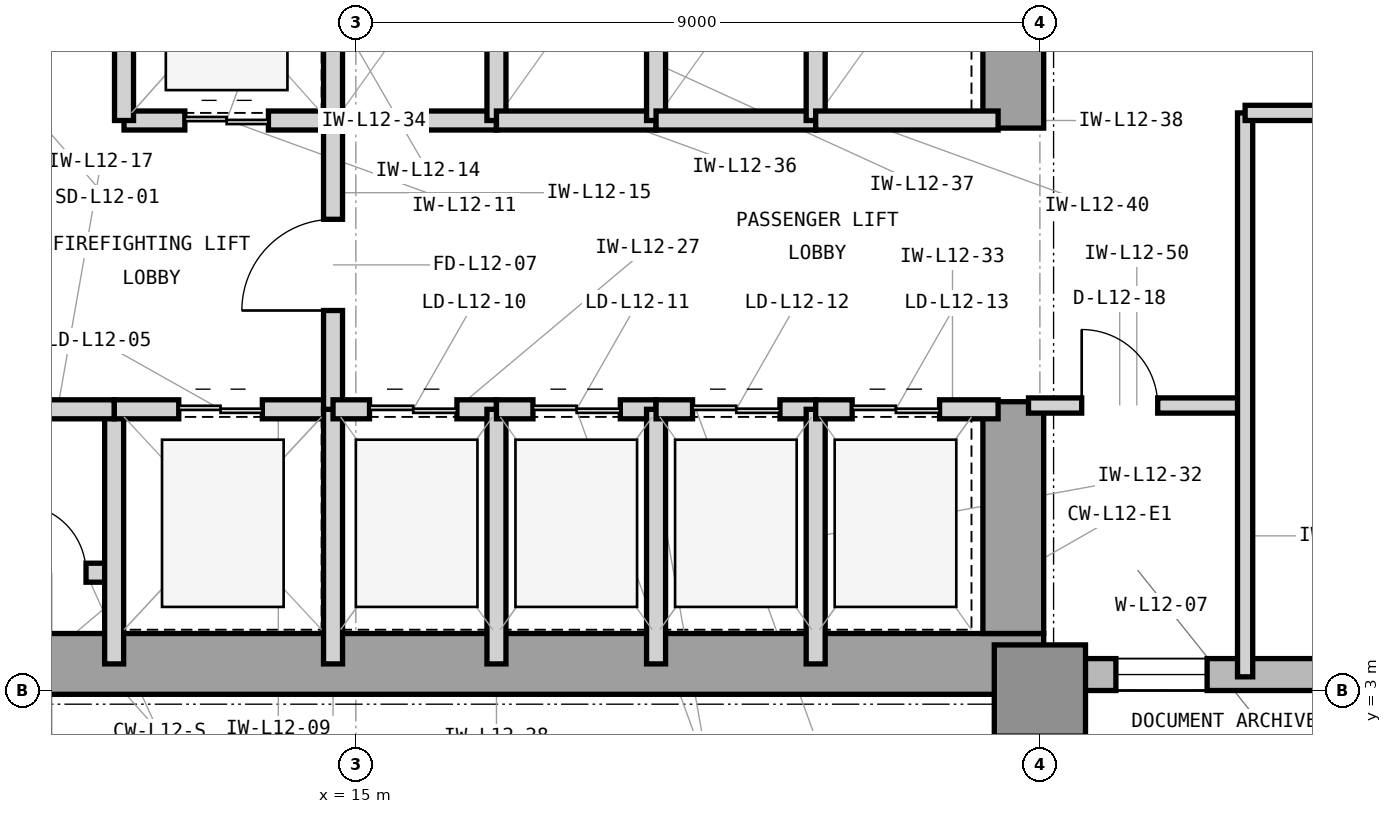
"""IFC4 building model, lengths in metres.
Left out: names, types, materials, properties, quantities, classifications, styles, units other than length and angle.
Written with IfcOpenShell. Run it as: python <this file> out.ifc"""

import sys

from ifc_helpers import new_model, si_unit, direction, frame, frame_2d, origin, origin_2d, place, context, subcontext, project, spatial, rectangle, extrude, element, fill, save


model = new_model("IFC4")
c1 = context("Model", 3, precision=1e-05, world=origin(), true_north=direction((0.0, 1.0)))
c2 = subcontext(c1, "Body", "Model", "MODEL_VIEW")
j1 = project(units=[si_unit("LENGTHUNIT", "METRE"), si_unit("PLANEANGLEUNIT", "RADIAN")], contexts=[c1])
p1 = place(None, origin())
s1 = spatial("IfcSite", under=j1, at=p1, CompositionType="ELEMENT")
p2 = place(p1, origin())
s2 = spatial("IfcBuilding", under=s1, at=p2, CompositionType="ELEMENT")
p3 = place(p2, frame((0.0, 0.0, 55.2)))
s3 = spatial("IfcBuildingStorey", under=s2, at=p3, CompositionType="ELEMENT", Elevation=55.2)
p4 = place(p3, frame((7.475, 3.35, 0.0), z_axis=(0.0, 0.0, 1.0), x_axis=(1.0, 0.0, 0.0)))
e1 = element("IfcWall", 1, at=p4, inside=s3, PredefinedType="SHEAR", context=c2, shape_type="SweptSolid", body=[
    extrude(rectangle(XDim=16.575, YDim=0.8, at=frame_2d((8.288, 0.0))), origin(), (0.0, 0.0, 1.0), 4.2),
])
p5 = place(p3, frame((23.65, 3.75, 0.0), z_axis=(0.0, 0.0, 1.0), x_axis=(0.0, 1.0, 0.0)))
e2 = element("IfcWall", 2, at=p5, inside=s3, PredefinedType="SHEAR", context=c2, shape_type="SweptSolid", body=[
    extrude(rectangle(XDim=3.05, YDim=0.8, at=frame_2d((1.525, 0.0))), origin(), (0.0, 0.0, 1.0), 4.2),
])
p6 = place(p3, frame((23.65, 10.4, 0.0), z_axis=(0.0, 0.0, 1.0), x_axis=(0.0, 1.0, 0.0)))
e3 = element("IfcWall", 3, at=p6, inside=s3, PredefinedType="SHEAR", context=c2, shape_type="SweptSolid", body=[
    extrude(rectangle(XDim=3.2, YDim=0.8, at=frame_2d((1.6, 0.0))), origin(), (0.0, 0.0, 1.0), 4.2),
])
p7 = place(p3, frame((24.0, 3.0, 0.0), z_axis=(0.0, 0.0, 1.0), x_axis=(1.0, 0.0, 0.0)))
e4 = element("IfcColumn", 4, at=p7, inside=s3, PredefinedType="COLUMN", context=c2, shape_type="SweptSolid", body=[
    extrude(rectangle(XDim=1.2, YDim=1.2, at=origin_2d()), origin(), (0.0, 0.0, 1.0), 4.2),
])
p8 = place(p3, frame((23.9, 3.21, 0.0), z_axis=(0.0, 0.0, 1.0), x_axis=(1.0, 0.0, 0.0)))
e5 = element("IfcWall", 5, at=p8, inside=s3, PredefinedType="STANDARD", context=c2, shape_type="SweptSolid", body=[
    extrude(rectangle(XDim=40.5, YDim=0.42, at=frame_2d((20.25, 0.0))), origin(), (0.0, 0.0, 1.0), 3.98),
])
p9 = place(p8, frame((1.1, 0.0, 0.85)))
e6 = element("IfcOpeningElement", 6, at=p9, cuts=e5, PredefinedType="OPENING", context=c2, shape_type="SweptSolid", body=[
    extrude(rectangle(XDim=1.2, YDim=2.45, at=frame_2d((0.6, 1.225))), frame((0.0, 0.22, 0.0), z_axis=(0.0, -1.0, 0.0), x_axis=(1.0, 0.0, 0.0)), (0.0, 0.0, 1.0), 0.44),
])
p10 = place(p8, frame((5.336, 0.0, 0.85)))
e7 = element("IfcOpeningElement", 7, at=p10, cuts=e5, PredefinedType="OPENING", context=c2, shape_type="SweptSolid", body=[
    extrude(rectangle(XDim=2.8, YDim=2.45, at=frame_2d((1.4, 1.225))), frame((0.0, 0.22, 0.0), z_axis=(0.0, -1.0, 0.0), x_axis=(1.0, 0.0, 0.0)), (0.0, 0.0, 1.0), 0.44),
])
p11 = place(p8, frame((19.086, 0.0, 0.85)))
e8 = element("IfcOpeningElement", 8, at=p11, cuts=e5, PredefinedType="OPENING", context=c2, shape_type="SweptSolid", body=[
    extrude(rectangle(XDim=2.8, YDim=2.45, at=frame_2d((1.4, 1.225))), frame((0.0, 0.22, 0.0), z_axis=(0.0, -1.0, 0.0), x_axis=(1.0, 0.0, 0.0)), (0.0, 0.0, 1.0), 0.44),
])
p12 = place(p8, frame((27.886, 0.0, 0.85)))
e9 = element("IfcOpeningElement", 9, at=p12, cuts=e5, PredefinedType="OPENING", context=c2, shape_type="SweptSolid", body=[
    extrude(rectangle(XDim=1.2, YDim=2.45, at=frame_2d((0.6, 1.225))), frame((0.0, 0.22, 0.0), z_axis=(0.0, -1.0, 0.0), x_axis=(1.0, 0.0, 0.0)), (0.0, 0.0, 1.0), 0.44),
])
p13 = place(p3, frame((10.33, 4.55, 0.0), z_axis=(0.0, 0.0, 1.0), x_axis=(1.0, 0.0, 0.0)))
e10 = element("IfcWall", 10, at=p13, inside=s3, PredefinedType="PARTITIONING", context=c2, shape_type="SweptSolid", body=[
    extrude(rectangle(XDim=1.49, YDim=0.25, at=frame_2d((0.745, 0.0))), origin(), (0.0, 0.0, 1.0), 3.97),
])
p14 = place(p13, frame((0.22, 0.0, 0.0)))
e11 = element("IfcOpeningElement", 11, at=p14, cuts=e10, PredefinedType="OPENING", context=c2, shape_type="SweptSolid", body=[
    extrude(rectangle(XDim=0.9, YDim=2.1, at=frame_2d((0.45, 1.05))), frame((0.0, 0.135, 0.0), z_axis=(0.0, -1.0, 0.0), x_axis=(1.0, 0.0, 0.0)), (0.0, 0.0, 1.0), 0.27),
])
p15 = place(p3, frame((11.82, 3.35, 0.0), z_axis=(0.0, 0.0, 1.0), x_axis=(0.0, 1.0, 0.0)))
e12 = element("IfcWall", 12, at=p15, inside=s3, PredefinedType="PARTITIONING", context=c2, shape_type="SweptSolid", body=[
    extrude(rectangle(XDim=3.35, YDim=0.25, at=frame_2d((1.675, 0.0))), origin(), (0.0, 0.0, 1.0), 3.97),
])
p16 = place(p3, frame((11.82, 6.7, 0.0), z_axis=(0.0, 0.0, 1.0), x_axis=(1.0, 0.0, 0.0)))
e13 = element("IfcWall", 13, at=p16, inside=s3, PredefinedType="PARTITIONING", context=c2, shape_type="SweptSolid", body=[
    extrude(rectangle(XDim=2.88, YDim=0.25, at=frame_2d((1.44, 0.0))), origin(), (0.0, 0.0, 1.0), 3.426),
])
p17 = place(p16, frame((0.85, 0.0, 0.0)))
e14 = element("IfcOpeningElement", 14, at=p17, cuts=e13, PredefinedType="OPENING", context=c2, shape_type="SweptSolid", body=[
    extrude(rectangle(XDim=1.1, YDim=2.25, at=frame_2d((0.55, 1.125))), frame((0.0, 0.135, 0.0), z_axis=(0.0, -1.0, 0.0), x_axis=(1.0, 0.0, 0.0)), (0.0, 0.0, 1.0), 0.27),
])
p18 = place(p3, frame((14.7, 3.35, 0.0), z_axis=(0.0, 0.0, 1.0), x_axis=(0.0, 1.0, 0.0)))
e15 = element("IfcWall", 15, at=p18, inside=s3, PredefinedType="PARTITIONING", context=c2, shape_type="SweptSolid", body=[
    extrude(rectangle(XDim=3.35, YDim=0.25, at=frame_2d((1.675, 0.0))), origin(), (0.0, 0.0, 1.0), 3.97),
])
p19 = place(p3, frame((11.95, 10.5, 0.0), z_axis=(0.0, 0.0, 1.0), x_axis=(1.0, 0.0, 0.0)))
e16 = element("IfcWall", 16, at=p19, inside=s3, PredefinedType="PARTITIONING", context=c2, shape_type="SweptSolid", body=[
    extrude(rectangle(XDim=2.75, YDim=0.25, at=frame_2d((1.375, 0.0))), origin(), (0.0, 0.0, 1.0), 3.426),
])
p20 = place(p19, frame((0.8, 0.0, 0.0)))
e17 = element("IfcOpeningElement", 17, at=p20, cuts=e16, PredefinedType="OPENING", context=c2, shape_type="SweptSolid", body=[
    extrude(rectangle(XDim=1.1, YDim=2.25, at=frame_2d((0.55, 1.125))), frame((0.0, 0.135, 0.0), z_axis=(0.0, -1.0, 0.0), x_axis=(1.0, 0.0, 0.0)), (0.0, 0.0, 1.0), 0.27),
])
for number, where, z_axis, x_axis in (
    (18, (11.95, 10.5, 0.0), (0.0, 0.0, 1.0), (0.0, 1.0, 0.0)),
    (19, (14.7, 10.5, 0.0), (0.0, 0.0, 1.0), (0.0, 1.0, 0.0)),
):
    element("IfcWall", number, at=place(p3, frame(where, z_axis=z_axis, x_axis=x_axis)), inside=s3, PredefinedType="PARTITIONING", context=c2, shape_type="SweptSolid", body=[
        extrude(rectangle(XDim=3.0, YDim=0.25, at=frame_2d((1.5, 0.0))), origin(), (0.0, 0.0, 1.0), 3.97),
    ])
p21 = place(p3, frame((14.7, 6.7, 0.0), z_axis=(0.0, 0.0, 1.0), x_axis=(0.0, 1.0, 0.0)))
e20 = element("IfcWall", 20, at=p21, inside=s3, PredefinedType="PARTITIONING", context=c2, shape_type="SweptSolid", body=[
    extrude(rectangle(XDim=3.8, YDim=0.25, at=frame_2d((1.9, 0.0))), origin(), (0.0, 0.0, 1.0), 3.97),
])
p22 = place(p21, frame((1.3, 0.0, 0.0)))
e21 = element("IfcOpeningElement", 21, at=p22, cuts=e20, PredefinedType="OPENING", context=c2, shape_type="SweptSolid", body=[
    extrude(rectangle(XDim=1.2, YDim=2.2, at=frame_2d((0.6, 1.1))), frame((0.0, 0.135, 0.0), z_axis=(0.0, -1.0, 0.0), x_axis=(1.0, 0.0, 0.0)), (0.0, 0.0, 1.0), 0.27),
])
p23 = place(p3, frame((10.33, 6.7, 0.0), z_axis=(0.0, 0.0, 1.0), x_axis=(1.0, 0.0, 0.0)))
e22 = element("IfcWall", 22, at=p23, inside=s3, PredefinedType="PARTITIONING", context=c2, shape_type="SweptSolid", body=[
    extrude(rectangle(XDim=1.49, YDim=0.25, at=frame_2d((0.745, 0.0))), origin(), (0.0, 0.0, 1.0), 3.426),
])
p24 = place(p3, frame((14.7, 6.7, 0.0), z_axis=(0.0, 0.0, 1.0), x_axis=(1.0, 0.0, 0.0)))
e23 = element("IfcWall", 23, at=p24, inside=s3, PredefinedType="PARTITIONING", context=c2, shape_type="SweptSolid", body=[
    extrude(rectangle(XDim=2.15, YDim=0.25, at=frame_2d((1.075, 0.0))), origin(), (0.0, 0.0, 1.0), 3.426),
])
p25 = place(p24, frame((0.48, 0.0, 0.0)))
e24 = element("IfcOpeningElement", 24, at=p25, cuts=e23, PredefinedType="OPENING", context=c2, shape_type="SweptSolid", body=[
    extrude(rectangle(XDim=1.15, YDim=2.25, at=frame_2d((0.575, 1.125))), frame((0.0, 0.135, 0.0), z_axis=(0.0, -1.0, 0.0), x_axis=(1.0, 0.0, 0.0)), (0.0, 0.0, 1.0), 0.27),
])
p26 = place(p3, frame((16.85, 3.35, 0.0), z_axis=(0.0, 0.0, 1.0), x_axis=(0.0, 1.0, 0.0)))
e25 = element("IfcWall", 25, at=p26, inside=s3, PredefinedType="PARTITIONING", context=c2, shape_type="SweptSolid", body=[
    extrude(rectangle(XDim=3.35, YDim=0.25, at=frame_2d((1.675, 0.0))), origin(), (0.0, 0.0, 1.0), 3.97),
])
p27 = place(p3, frame((16.85, 6.7, 0.0), z_axis=(0.0, 0.0, 1.0), x_axis=(1.0, 0.0, 0.0)))
e26 = element("IfcWall", 26, at=p27, inside=s3, PredefinedType="PARTITIONING", context=c2, shape_type="SweptSolid", body=[
    extrude(rectangle(XDim=2.1, YDim=0.25, at=frame_2d((1.05, 0.0))), origin(), (0.0, 0.0, 1.0), 3.426),
])
p28 = place(p27, frame((0.48, 0.0, 0.0)))
e27 = element("IfcOpeningElement", 27, at=p28, cuts=e26, PredefinedType="OPENING", context=c2, shape_type="SweptSolid", body=[
    extrude(rectangle(XDim=1.15, YDim=2.25, at=frame_2d((0.575, 1.125))), frame((0.0, 0.135, 0.0), z_axis=(0.0, -1.0, 0.0), x_axis=(1.0, 0.0, 0.0)), (0.0, 0.0, 1.0), 0.27),
])
p29 = place(p3, frame((18.95, 3.35, 0.0), z_axis=(0.0, 0.0, 1.0), x_axis=(0.0, 1.0, 0.0)))
e28 = element("IfcWall", 28, at=p29, inside=s3, PredefinedType="PARTITIONING", context=c2, shape_type="SweptSolid", body=[
    extrude(rectangle(XDim=3.35, YDim=0.25, at=frame_2d((1.675, 0.0))), origin(), (0.0, 0.0, 1.0), 3.97),
])
p30 = place(p3, frame((18.95, 6.7, 0.0), z_axis=(0.0, 0.0, 1.0), x_axis=(1.0, 0.0, 0.0)))
e29 = element("IfcWall", 29, at=p30, inside=s3, PredefinedType="PARTITIONING", context=c2, shape_type="SweptSolid", body=[
    extrude(rectangle(XDim=2.1, YDim=0.25, at=frame_2d((1.05, 0.0))), origin(), (0.0, 0.0, 1.0), 3.426),
])
p31 = place(p30, frame((0.48, 0.0, 0.0)))
e30 = element("IfcOpeningElement", 30, at=p31, cuts=e29, PredefinedType="OPENING", context=c2, shape_type="SweptSolid", body=[
    extrude(rectangle(XDim=1.15, YDim=2.25, at=frame_2d((0.575, 1.125))), frame((0.0, 0.135, 0.0), z_axis=(0.0, -1.0, 0.0), x_axis=(1.0, 0.0, 0.0)), (0.0, 0.0, 1.0), 0.27),
])
p32 = place(p3, frame((21.05, 3.35, 0.0), z_axis=(0.0, 0.0, 1.0), x_axis=(0.0, 1.0, 0.0)))
e31 = element("IfcWall", 31, at=p32, inside=s3, PredefinedType="PARTITIONING", context=c2, shape_type="SweptSolid", body=[
    extrude(rectangle(XDim=3.35, YDim=0.25, at=frame_2d((1.675, 0.0))), origin(), (0.0, 0.0, 1.0), 3.97),
])
p33 = place(p3, frame((21.05, 6.7, 0.0), z_axis=(0.0, 0.0, 1.0), x_axis=(1.0, 0.0, 0.0)))
e32 = element("IfcWall", 32, at=p33, inside=s3, PredefinedType="PARTITIONING", context=c2, shape_type="SweptSolid", body=[
    extrude(rectangle(XDim=2.4, YDim=0.25, at=frame_2d((1.2, 0.0))), origin(), (0.0, 0.0, 1.0), 3.426),
])
p34 = place(p33, frame((0.48, 0.0, 0.0)))
e33 = element("IfcOpeningElement", 33, at=p34, cuts=e32, PredefinedType="OPENING", context=c2, shape_type="SweptSolid", body=[
    extrude(rectangle(XDim=1.15, YDim=2.25, at=frame_2d((0.575, 1.125))), frame((0.0, 0.135, 0.0), z_axis=(0.0, -1.0, 0.0), x_axis=(1.0, 0.0, 0.0)), (0.0, 0.0, 1.0), 0.27),
])
p35 = place(p3, frame((14.7, 10.5, 0.0), z_axis=(0.0, 0.0, 1.0), x_axis=(1.0, 0.0, 0.0)))
e34 = element("IfcWall", 34, at=p35, inside=s3, PredefinedType="PARTITIONING", context=c2, shape_type="SweptSolid", body=[
    extrude(rectangle(XDim=2.15, YDim=0.25, at=frame_2d((1.075, 0.0))), origin(), (0.0, 0.0, 1.0), 3.426),
])
p36 = place(p3, frame((16.85, 10.5, 0.0), z_axis=(0.0, 0.0, 1.0), x_axis=(0.0, 1.0, 0.0)))
e35 = element("IfcWall", 35, at=p36, inside=s3, PredefinedType="PARTITIONING", context=c2, shape_type="SweptSolid", body=[
    extrude(rectangle(XDim=3.0, YDim=0.25, at=frame_2d((1.5, 0.0))), origin(), (0.0, 0.0, 1.0), 3.97),
])
p37 = place(p3, frame((16.85, 10.5, 0.0), z_axis=(0.0, 0.0, 1.0), x_axis=(1.0, 0.0, 0.0)))
e36 = element("IfcWall", 36, at=p37, inside=s3, PredefinedType="PARTITIONING", context=c2, shape_type="SweptSolid", body=[
    extrude(rectangle(XDim=2.1, YDim=0.25, at=frame_2d((1.05, 0.0))), origin(), (0.0, 0.0, 1.0), 3.426),
])
p38 = place(p3, frame((18.95, 10.5, 0.0), z_axis=(0.0, 0.0, 1.0), x_axis=(0.0, 1.0, 0.0)))
e37 = element("IfcWall", 37, at=p38, inside=s3, PredefinedType="PARTITIONING", context=c2, shape_type="SweptSolid", body=[
    extrude(rectangle(XDim=3.0, YDim=0.25, at=frame_2d((1.5, 0.0))), origin(), (0.0, 0.0, 1.0), 3.97),
])
p39 = place(p3, frame((18.95, 10.5, 0.0), z_axis=(0.0, 0.0, 1.0), x_axis=(1.0, 0.0, 0.0)))
e38 = element("IfcWall", 38, at=p39, inside=s3, PredefinedType="PARTITIONING", context=c2, shape_type="SweptSolid", body=[
    extrude(rectangle(XDim=2.1, YDim=0.25, at=frame_2d((1.05, 0.0))), origin(), (0.0, 0.0, 1.0), 3.426),
])
p40 = place(p3, frame((21.05, 10.5, 0.0), z_axis=(0.0, 0.0, 1.0), x_axis=(0.0, 1.0, 0.0)))
e39 = element("IfcWall", 39, at=p40, inside=s3, PredefinedType="PARTITIONING", context=c2, shape_type="SweptSolid", body=[
    extrude(rectangle(XDim=3.0, YDim=0.25, at=frame_2d((1.5, 0.0))), origin(), (0.0, 0.0, 1.0), 3.97),
])
p41 = place(p3, frame((21.05, 10.5, 0.0), z_axis=(0.0, 0.0, 1.0), x_axis=(1.0, 0.0, 0.0)))
e40 = element("IfcWall", 40, at=p41, inside=s3, PredefinedType="PARTITIONING", context=c2, shape_type="SweptSolid", body=[
    extrude(rectangle(XDim=2.4, YDim=0.25, at=frame_2d((1.2, 0.0))), origin(), (0.0, 0.0, 1.0), 3.426),
])
p42 = place(p3, frame((23.85, 6.75, 0.0), z_axis=(0.0, 0.0, 1.0), x_axis=(1.0, 0.0, 0.0)))
e41 = element("IfcWall", 41, at=p42, inside=s3, PredefinedType="PARTITIONING", context=c2, shape_type="SweptSolid", body=[
    extrude(rectangle(XDim=2.85, YDim=0.2, at=frame_2d((1.425, 0.0))), origin(), (0.0, 0.0, 1.0), 3.97),
])
p43 = place(p42, frame((0.7, 0.0, 0.0)))
e42 = element("IfcOpeningElement", 42, at=p43, cuts=e41, PredefinedType="OPENING", context=c2, shape_type="SweptSolid", body=[
    extrude(rectangle(XDim=1.0, YDim=2.15, at=frame_2d((0.5, 1.075))), frame((0.0, 0.11, 0.0), z_axis=(0.0, -1.0, 0.0), x_axis=(1.0, 0.0, 0.0)), (0.0, 0.0, 1.0), 0.22),
])
p44 = place(p3, frame((26.7, 3.18, 0.0), z_axis=(0.0, 0.0, 1.0), x_axis=(0.0, 1.0, 0.0)))
e43 = element("IfcWall", 43, at=p44, inside=s3, PredefinedType="PARTITIONING", context=c2, shape_type="SweptSolid", body=[
    extrude(rectangle(XDim=7.42, YDim=0.2, at=frame_2d((3.71, 0.0))), origin(), (0.0, 0.0, 1.0), 3.97),
])
p45 = place(p3, frame((26.7, 10.6, 0.0), z_axis=(0.0, 0.0, 1.0), x_axis=(1.0, 0.0, 0.0)))
e44 = element("IfcWall", 44, at=p45, inside=s3, PredefinedType="PARTITIONING", context=c2, shape_type="SweptSolid", body=[
    extrude(rectangle(XDim=12.0, YDim=0.2, at=frame_2d((6.0, 0.0))), origin(), (0.0, 0.0, 1.0), 3.97),
])
p46 = place(p45, frame((5.0, 0.0, 0.0)))
e45 = element("IfcOpeningElement", 45, at=p46, cuts=e44, PredefinedType="OPENING", context=c2, shape_type="SweptSolid", body=[
    extrude(rectangle(XDim=2.0, YDim=2.5, at=frame_2d((1.0, 1.25))), frame((0.0, 0.11, 0.0), z_axis=(0.0, -1.0, 0.0), x_axis=(1.0, 0.0, 0.0)), (0.0, 0.0, 1.0), 0.22),
])
p47 = place(p14, origin())
e46 = element("IfcDoor", 46, at=p47, inside=s3, OperationType="SINGLE_SWING_LEFT", PredefinedType="TRAPDOOR", context=c2, shape_type="SweptSolid", body=[
    extrude(rectangle(XDim=0.9, YDim=2.1, at=frame_2d((0.45, 1.05))), frame((0.0, 0.025, 0.0), z_axis=(0.0, -1.0, 0.0), x_axis=(1.0, 0.0, 0.0)), (0.0, 0.0, 1.0), 0.05),
])
fill(e11, e46)
p48 = place(p17, origin())
e47 = element("IfcDoor", 47, at=p48, inside=s3, OperationType="DOUBLE_DOOR_SLIDING", PredefinedType="DOOR", context=c2, shape_type="SweptSolid", body=[
    extrude(rectangle(XDim=1.1, YDim=2.25, at=frame_2d((0.55, 1.125))), frame((0.0, 0.025, 0.0), z_axis=(0.0, -1.0, 0.0), x_axis=(1.0, 0.0, 0.0)), (0.0, 0.0, 1.0), 0.05),
])
fill(e14, e47)
p49 = place(p20, origin())
e48 = element("IfcDoor", 48, at=p49, inside=s3, OperationType="DOUBLE_DOOR_SLIDING", PredefinedType="DOOR", context=c2, shape_type="SweptSolid", body=[
    extrude(rectangle(XDim=1.1, YDim=2.25, at=frame_2d((0.55, 1.125))), frame((0.0, 0.025, 0.0), z_axis=(0.0, -1.0, 0.0), x_axis=(1.0, 0.0, 0.0)), (0.0, 0.0, 1.0), 0.05),
])
fill(e17, e48)
p50 = place(p22, origin())
e49 = element("IfcDoor", 49, at=p50, inside=s3, OperationType="SINGLE_SWING_LEFT", PredefinedType="DOOR", context=c2, shape_type="SweptSolid", body=[
    extrude(rectangle(XDim=1.2, YDim=2.2, at=frame_2d((0.6, 1.1))), frame((0.0, 0.025, 0.0), z_axis=(0.0, -1.0, 0.0), x_axis=(1.0, 0.0, 0.0)), (0.0, 0.0, 1.0), 0.05),
])
fill(e21, e49)
p51 = place(p25, origin())
e50 = element("IfcDoor", 50, at=p51, inside=s3, OperationType="DOUBLE_DOOR_SLIDING", PredefinedType="DOOR", context=c2, shape_type="SweptSolid", body=[
    extrude(rectangle(XDim=1.15, YDim=2.25, at=frame_2d((0.575, 1.125))), frame((0.0, 0.025, 0.0), z_axis=(0.0, -1.0, 0.0), x_axis=(1.0, 0.0, 0.0)), (0.0, 0.0, 1.0), 0.05),
])
fill(e24, e50)
p52 = place(p28, origin())
e51 = element("IfcDoor", 51, at=p52, inside=s3, OperationType="DOUBLE_DOOR_SLIDING", PredefinedType="DOOR", context=c2, shape_type="SweptSolid", body=[
    extrude(rectangle(XDim=1.15, YDim=2.25, at=frame_2d((0.575, 1.125))), frame((0.0, 0.025, 0.0), z_axis=(0.0, -1.0, 0.0), x_axis=(1.0, 0.0, 0.0)), (0.0, 0.0, 1.0), 0.05),
])
fill(e27, e51)
p53 = place(p31, origin())
e52 = element("IfcDoor", 52, at=p53, inside=s3, OperationType="DOUBLE_DOOR_SLIDING", PredefinedType="DOOR", context=c2, shape_type="SweptSolid", body=[
    extrude(rectangle(XDim=1.15, YDim=2.25, at=frame_2d((0.575, 1.125))), frame((0.0, 0.025, 0.0), z_axis=(0.0, -1.0, 0.0), x_axis=(1.0, 0.0, 0.0)), (0.0, 0.0, 1.0), 0.05),
])
fill(e30, e52)
p54 = place(p34, origin())
e53 = element("IfcDoor", 53, at=p54, inside=s3, OperationType="DOUBLE_DOOR_SLIDING", PredefinedType="DOOR", context=c2, shape_type="SweptSolid", body=[
    extrude(rectangle(XDim=1.15, YDim=2.25, at=frame_2d((0.575, 1.125))), frame((0.0, 0.025, 0.0), z_axis=(0.0, -1.0, 0.0), x_axis=(1.0, 0.0, 0.0)), (0.0, 0.0, 1.0), 0.05),
])
fill(e33, e53)
p55 = place(p43, origin())
e54 = element("IfcDoor", 54, at=p55, inside=s3, OperationType="SINGLE_SWING_LEFT", PredefinedType="DOOR", context=c2, shape_type="SweptSolid", body=[
    extrude(rectangle(XDim=1.0, YDim=2.15, at=frame_2d((0.5, 1.075))), frame((0.0, 0.025, 0.0), z_axis=(0.0, -1.0, 0.0), x_axis=(1.0, 0.0, 0.0)), (0.0, 0.0, 1.0), 0.05),
])
fill(e42, e54)
p56 = place(p9, origin())
e55 = element("IfcWindow", 55, at=p56, inside=s3, PartitioningType="SINGLE_PANEL", PredefinedType="WINDOW", context=c2, shape_type="SweptSolid", body=[
    extrude(rectangle(XDim=1.2, YDim=2.45, at=frame_2d((0.6, 1.225))), frame((0.0, 0.11, 0.0), z_axis=(0.0, -1.0, 0.0), x_axis=(1.0, 0.0, 0.0)), (0.0, 0.0, 1.0), 0.06),
])
fill(e6, e55)
save(model, sys.argv[1])
